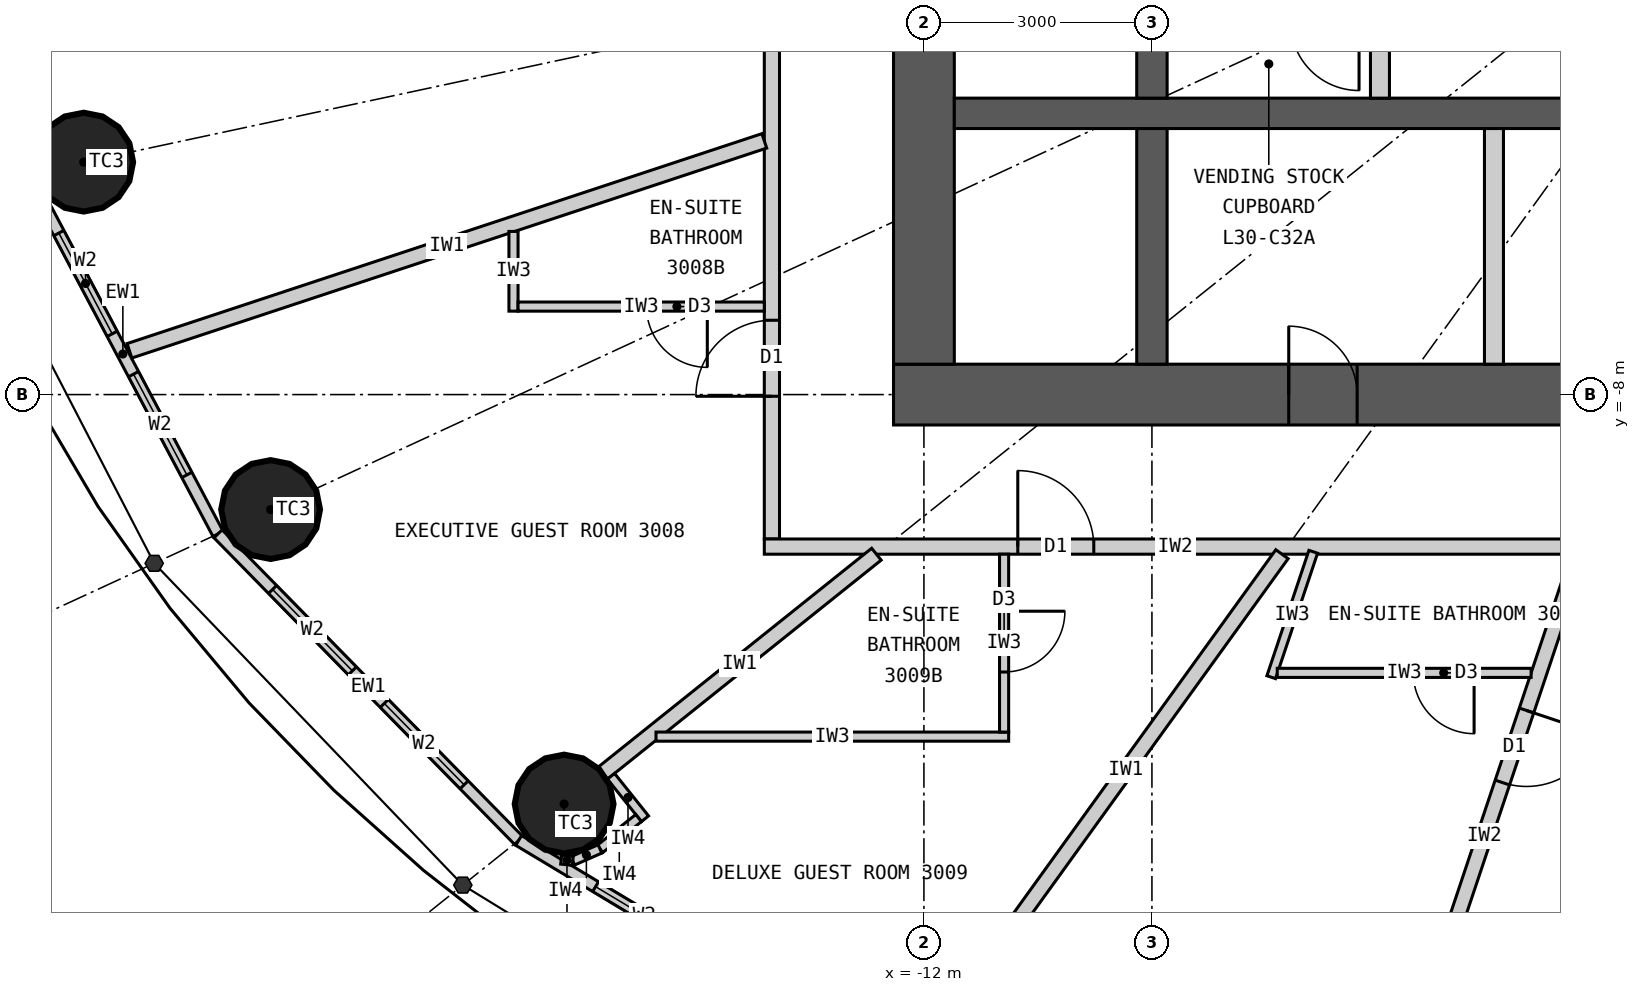
"""IFC4 building model, lengths in metres.
Left out: names, types, materials, properties, quantities, classifications, styles, units other than length and angle.
Written with IfcOpenShell. Run it as: python <this file> out.ifc"""

import sys

from ifc_helpers import new_model, si_unit, direction, frame, frame_2d, origin, origin_2d, place, context, subcontext, project, spatial, rectangle, circle, extrude, element, fill, save


model = new_model("IFC4")
c1 = context("Model", 3, precision=1e-05, world=origin(), true_north=direction((0.0, 1.0)))
c2 = subcontext(c1, "Body", "Model", "MODEL_VIEW")
j1 = project(units=[si_unit("LENGTHUNIT", "METRE"), si_unit("PLANEANGLEUNIT", "RADIAN")], contexts=[c1])
p1 = place(None, origin())
s1 = spatial("IfcSite", under=j1, at=p1, CompositionType="ELEMENT")
p2 = place(p1, origin())
s2 = spatial("IfcBuilding", under=s1, at=p2, CompositionType="ELEMENT")
p3 = place(p2, frame((0.0, 0.0, 118.8)))
s3 = spatial("IfcBuildingStorey", under=s2, at=p3, CompositionType="ELEMENT", Elevation=118.8)
for number, where, z_axis, x_axis in (
    (1, (-23.055, -4.942, 0.0), (0.0, 0.0, 1.0), (1.0, 0.0, 0.0)),
    (2, (-20.596, -9.513, 0.0), (0.0, 0.0, 1.0), (1.0, 0.0, 0.0)),
    (3, (-16.734, -13.387, 0.0), (0.0, 0.0, 1.0), (1.0, 0.0, 0.0)),
):
    element("IfcColumn", number, at=place(p3, frame(where, z_axis=z_axis, x_axis=x_axis)), inside=s3, PredefinedType="COLUMN", context=c2, shape_type="SweptSolid", body=[
        extrude(circle(Radius=0.65, at=origin_2d()), origin(), (0.0, 0.0, 1.0), 3.3),
    ])
p4 = place(p3, frame((12.4, -8.0, 0.0), z_axis=(0.0, 0.0, 1.0), x_axis=(-1.0, 0.0, 0.0)))
e4 = element("IfcWall", 4, at=p4, inside=s3, PredefinedType="SHEAR", context=c2, shape_type="SweptSolid", body=[
    extrude(rectangle(XDim=24.8, YDim=0.8, at=frame_2d((12.4, 0.0))), origin(), (0.0, 0.0, 1.0), 3.3),
])
p5 = place(p4, frame((11.1, 0.0, 0.0)))
e5 = element("IfcOpeningElement", 5, at=p5, cuts=e4, PredefinedType="OPENING", context=c2, shape_type="SweptSolid", body=[
    extrude(rectangle(XDim=1.2, YDim=2.2, at=frame_2d((0.6, 1.1))), frame((0.0, 0.41, 0.0), z_axis=(0.0, -1.0, 0.0), x_axis=(1.0, 0.0, 0.0)), (0.0, 0.0, 1.0), 0.82),
])
p6 = place(p4, frame((18.7, 0.0, 0.0)))
e6 = element("IfcOpeningElement", 6, at=p6, cuts=e4, PredefinedType="OPENING", context=c2, shape_type="SweptSolid", body=[
    extrude(rectangle(XDim=0.9, YDim=2.2, at=frame_2d((0.45, 1.1))), frame((0.0, 0.41, 0.0), z_axis=(0.0, -1.0, 0.0), x_axis=(1.0, 0.0, 0.0)), (0.0, 0.0, 1.0), 0.82),
])
p7 = place(p3, frame((-12.0, 7.6, 0.0), z_axis=(0.0, 0.0, 1.0), x_axis=(0.0, -1.0, 0.0)))
e7 = element("IfcWall", 7, at=p7, inside=s3, PredefinedType="SHEAR", context=c2, shape_type="SweptSolid", body=[
    extrude(rectangle(XDim=15.2, YDim=0.8, at=frame_2d((7.6, 0.0))), origin(), (0.0, 0.0, 1.0), 3.3),
])
p8 = place(p7, frame((6.7, 0.0, 0.0)))
e8 = element("IfcOpeningElement", 8, at=p8, cuts=e7, PredefinedType="OPENING", context=c2, shape_type="SweptSolid", body=[
    extrude(rectangle(XDim=1.8, YDim=2.2, at=frame_2d((0.9, 1.1))), frame((0.0, 0.41, 0.0), z_axis=(0.0, -1.0, 0.0), x_axis=(1.0, 0.0, 0.0)), (0.0, 0.0, 1.0), 0.82),
])
p9 = place(p3, frame((-11.6, -4.3, 0.0), z_axis=(0.0, 0.0, 1.0), x_axis=(1.0, 0.0, 0.0)))
e9 = element("IfcWall", 9, at=p9, inside=s3, PredefinedType="SHEAR", context=c2, shape_type="SweptSolid", body=[
    extrude(rectangle(XDim=23.2, YDim=0.4, at=frame_2d((11.6, 0.0))), origin(), (0.0, 0.0, 1.0), 3.3),
])
p10 = place(p3, frame((-9.0, -4.1, 0.0), z_axis=(0.0, 0.0, 1.0), x_axis=(0.0, 1.0, 0.0)))
e10 = element("IfcWall", 10, at=p10, inside=s3, PredefinedType="SHEAR", context=c2, shape_type="SweptSolid", body=[
    extrude(rectangle(XDim=2.35, YDim=0.4, at=frame_2d((1.175, 0.0))), origin(), (0.0, 0.0, 1.0), 3.3),
])
p11 = place(p3, frame((-9.0, -7.6, 0.0), z_axis=(0.0, 0.0, 1.0), x_axis=(0.0, 1.0, 0.0)))
e11 = element("IfcWall", 11, at=p11, inside=s3, PredefinedType="SHEAR", context=c2, shape_type="SweptSolid", body=[
    extrude(rectangle(XDim=3.1, YDim=0.4, at=frame_2d((1.55, 0.0))), origin(), (0.0, 0.0, 1.0), 3.3),
])
p12 = place(p3, frame((-4.5, -7.6, 0.0), z_axis=(0.0, 0.0, 1.0), x_axis=(0.0, 1.0, 0.0)))
e12 = element("IfcWall", 12, at=p12, inside=s3, PredefinedType="PARTITIONING", context=c2, shape_type="SweptSolid", body=[
    extrude(rectangle(XDim=3.1, YDim=0.25, at=frame_2d((1.55, 0.0))), origin(), (0.0, 0.0, 1.0), 3.3),
])
p13 = place(p3, frame((-6.0, -4.1, 0.0), z_axis=(0.0, 0.0, 1.0), x_axis=(0.0, 1.0, 0.0)))
e13 = element("IfcWall", 13, at=p13, inside=s3, PredefinedType="PARTITIONING", context=c2, shape_type="SweptSolid", body=[
    extrude(rectangle(XDim=2.35, YDim=0.25, at=frame_2d((1.175, 0.0))), origin(), (0.0, 0.0, 1.0), 3.3),
])
p14 = place(p3, frame((-23.792, -5.1, 0.0), z_axis=(0.0, 0.0, 1.0), x_axis=(0.467814388454, -0.883826735257, 0.0)))
e14 = element("IfcWall", 14, at=p14, inside=s3, PredefinedType="ELEMENTEDWALL", context=c2, shape_type="SweptSolid", body=[
    extrude(rectangle(XDim=5.354, YDim=0.15, at=frame_2d((2.677, 0.0))), origin(), (0.0, 0.0, 1.0), 3.12),
])
p15 = place(p14, frame((0.877, 0.0, 0.9)))
e15 = element("IfcOpeningElement", 15, at=p15, cuts=e14, PredefinedType="OPENING", context=c2, shape_type="SweptSolid", body=[
    extrude(rectangle(XDim=1.5, YDim=1.9, at=frame_2d((0.75, 0.95))), frame((0.0, 0.085, 0.0), z_axis=(0.0, -1.0, 0.0), x_axis=(1.0, 0.0, 0.0)), (0.0, 0.0, 1.0), 0.17),
])
p16 = place(p14, frame((2.977, 0.0, 0.9)))
e16 = element("IfcOpeningElement", 16, at=p16, cuts=e14, PredefinedType="OPENING", context=c2, shape_type="SweptSolid", body=[
    extrude(rectangle(XDim=1.5, YDim=1.9, at=frame_2d((0.75, 0.95))), frame((0.0, 0.085, 0.0), z_axis=(0.0, -1.0, 0.0), x_axis=(1.0, 0.0, 0.0)), (0.0, 0.0, 1.0), 0.17),
])
p17 = place(p3, frame((-21.287, -9.832, 0.0), z_axis=(0.0, 0.0, 1.0), x_axis=(0.700136650834, -0.714008872605, 0.0)))
e17 = element("IfcWall", 17, at=p17, inside=s3, PredefinedType="ELEMENTEDWALL", context=c2, shape_type="SweptSolid", body=[
    extrude(rectangle(XDim=5.649, YDim=0.15, at=frame_2d((2.825, 0.0))), origin(), (0.0, 0.0, 1.0), 3.12),
])
p18 = place(p17, frame((1.025, 0.0, 0.9)))
e18 = element("IfcOpeningElement", 18, at=p18, cuts=e17, PredefinedType="OPENING", context=c2, shape_type="SweptSolid", body=[
    extrude(rectangle(XDim=1.5, YDim=1.9, at=frame_2d((0.75, 0.95))), frame((0.0, 0.085, 0.0), z_axis=(0.0, -1.0, 0.0), x_axis=(1.0, 0.0, 0.0)), (0.0, 0.0, 1.0), 0.17),
])
p19 = place(p17, frame((3.125, 0.0, 0.9)))
e19 = element("IfcOpeningElement", 19, at=p19, cuts=e17, PredefinedType="OPENING", context=c2, shape_type="SweptSolid", body=[
    extrude(rectangle(XDim=1.5, YDim=1.9, at=frame_2d((0.75, 0.95))), frame((0.0, 0.085, 0.0), z_axis=(0.0, -1.0, 0.0), x_axis=(1.0, 0.0, 0.0)), (0.0, 0.0, 1.0), 0.17),
])
p20 = place(p3, frame((-17.332, -13.866, 0.0), z_axis=(0.0, 0.0, 1.0), x_axis=(0.857308573723, -0.514802884044, 0.0)))
e20 = element("IfcWall", 20, at=p20, inside=s3, PredefinedType="ELEMENTEDWALL", context=c2, shape_type="SweptSolid", body=[
    extrude(rectangle(XDim=5.961, YDim=0.15, at=frame_2d((2.98, 0.0))), origin(), (0.0, 0.0, 1.0), 3.12),
])
p21 = place(p20, frame((1.181, 0.0, 0.9)))
e21 = element("IfcOpeningElement", 21, at=p21, cuts=e20, PredefinedType="OPENING", context=c2, shape_type="SweptSolid", body=[
    extrude(rectangle(XDim=1.5, YDim=1.9, at=frame_2d((0.75, 0.95))), frame((0.0, 0.085, 0.0), z_axis=(0.0, -1.0, 0.0), x_axis=(1.0, 0.0, 0.0)), (0.0, 0.0, 1.0), 0.17),
])
p22 = place(p20, frame((3.281, 0.0, 0.9)))
e22 = element("IfcOpeningElement", 22, at=p22, cuts=e20, PredefinedType="OPENING", context=c2, shape_type="SweptSolid", body=[
    extrude(rectangle(XDim=1.5, YDim=1.9, at=frame_2d((0.75, 0.95))), frame((0.0, 0.085, 0.0), z_axis=(0.0, -1.0, 0.0), x_axis=(1.0, 0.0, 0.0)), (0.0, 0.0, 1.0), 0.17),
])
p23 = place(p3, frame((-14.0, 9.9, 0.0), z_axis=(0.0, 0.0, 1.0), x_axis=(0.0, -1.0, 0.0)))
e23 = element("IfcWall", 23, at=p23, inside=s3, PredefinedType="PARTITIONING", context=c2, shape_type="SweptSolid", body=[
    extrude(rectangle(XDim=19.8, YDim=0.2, at=frame_2d((9.9, 0.0))), origin(), (0.0, 0.0, 1.0), 3.12),
])
p24 = place(p23, frame((1.678, 0.0, 0.0)))
e24 = element("IfcOpeningElement", 24, at=p24, cuts=e23, PredefinedType="OPENING", context=c2, shape_type="SweptSolid", body=[
    extrude(rectangle(XDim=1.0, YDim=2.2, at=frame_2d((0.5, 1.1))), frame((0.0, 0.11, 0.0), z_axis=(0.0, -1.0, 0.0), x_axis=(1.0, 0.0, 0.0)), (0.0, 0.0, 1.0), 0.22),
])
p25 = place(p23, frame((7.598, 0.0, 0.0)))
e25 = element("IfcOpeningElement", 25, at=p25, cuts=e23, PredefinedType="OPENING", context=c2, shape_type="SweptSolid", body=[
    extrude(rectangle(XDim=1.0, YDim=2.2, at=frame_2d((0.5, 1.1))), frame((0.0, 0.11, 0.0), z_axis=(0.0, -1.0, 0.0), x_axis=(1.0, 0.0, 0.0)), (0.0, 0.0, 1.0), 0.22),
])
p26 = place(p23, frame((12.26, 0.0, 0.0)))
e26 = element("IfcOpeningElement", 26, at=p26, cuts=e23, PredefinedType="OPENING", context=c2, shape_type="SweptSolid", body=[
    extrude(rectangle(XDim=1.0, YDim=2.2, at=frame_2d((0.5, 1.1))), frame((0.0, 0.11, 0.0), z_axis=(0.0, -1.0, 0.0), x_axis=(1.0, 0.0, 0.0)), (0.0, 0.0, 1.0), 0.22),
])
p27 = place(p23, frame((16.922, 0.0, 0.0)))
e27 = element("IfcOpeningElement", 27, at=p27, cuts=e23, PredefinedType="OPENING", context=c2, shape_type="SweptSolid", body=[
    extrude(rectangle(XDim=1.0, YDim=2.2, at=frame_2d((0.5, 1.1))), frame((0.0, 0.11, 0.0), z_axis=(0.0, -1.0, 0.0), x_axis=(1.0, 0.0, 0.0)), (0.0, 0.0, 1.0), 0.22),
])
p28 = place(p3, frame((-3.283, -10.0, 0.0), z_axis=(0.0, 0.0, 1.0), x_axis=(-1.0, 0.0, 0.0)))
e28 = element("IfcWall", 28, at=p28, inside=s3, PredefinedType="PARTITIONING", context=c2, shape_type="SweptSolid", body=[
    extrude(rectangle(XDim=10.817, YDim=0.2, at=frame_2d((5.409, 0.0))), origin(), (0.0, 0.0, 1.0), 3.12),
])
p29 = place(p28, frame((6.482, 0.0, 0.0)))
e29 = element("IfcOpeningElement", 29, at=p29, cuts=e28, PredefinedType="OPENING", context=c2, shape_type="SweptSolid", body=[
    extrude(rectangle(XDim=1.0, YDim=2.2, at=frame_2d((0.5, 1.1))), frame((0.0, 0.11, 0.0), z_axis=(0.0, -1.0, 0.0), x_axis=(1.0, 0.0, 0.0)), (0.0, 0.0, 1.0), 0.22),
])
p30 = place(p3, frame((-14.1, -4.662, 0.0), z_axis=(0.0, 0.0, 1.0), x_axis=(-0.949446466373, -0.313928984789, 0.0)))
e30 = element("IfcWall", 30, at=p30, inside=s3, PredefinedType="PARTITIONING", context=c2, shape_type="SweptSolid", body=[
    extrude(rectangle(XDim=8.797, YDim=0.2, at=frame_2d((4.399, 0.0))), origin(), (0.0, 0.0, 1.0), 3.12),
])
p31 = place(p3, frame((-12.625, -10.1, 0.0), z_axis=(0.0, 0.0, 1.0), x_axis=(-0.780863644897, -0.624701503182, 0.0)))
e31 = element("IfcWall", 31, at=p31, inside=s3, PredefinedType="PARTITIONING", context=c2, shape_type="SweptSolid", body=[
    extrude(rectangle(XDim=4.612, YDim=0.2, at=frame_2d((2.306, 0.0))), origin(), (0.0, 0.0, 1.0), 2.37),
])
p32 = place(p3, frame((-7.289, -10.1, 0.0), z_axis=(0.0, 0.0, 1.0), x_axis=(-0.585217367024, -0.81087645997, 0.0)))
e32 = element("IfcWall", 32, at=p32, inside=s3, PredefinedType="PARTITIONING", context=c2, shape_type="SweptSolid", body=[
    extrude(rectangle(XDim=7.016, YDim=0.2, at=frame_2d((3.508, 0.0))), origin(), (0.0, 0.0, 1.0), 2.37),
])
p33 = place(p3, frame((-3.383, -10.1, 0.0), z_axis=(0.0, 0.0, 1.0), x_axis=(-0.317603705574, -0.948223542318, 0.0)))
e33 = element("IfcWall", 33, at=p33, inside=s3, PredefinedType="PARTITIONING", context=c2, shape_type="SweptSolid", body=[
    extrude(rectangle(XDim=7.823, YDim=0.2, at=frame_2d((3.912, 0.0))), origin(), (0.0, 0.0, 1.0), 2.37),
])
p34 = place(p33, frame((2.168, 0.0, 0.0)))
e34 = element("IfcOpeningElement", 34, at=p34, cuts=e33, PredefinedType="OPENING", context=c2, shape_type="SweptSolid", body=[
    extrude(rectangle(XDim=1.0, YDim=2.2, at=frame_2d((0.5, 1.1))), frame((0.0, 0.11, 0.0), z_axis=(0.0, -1.0, 0.0), x_axis=(1.0, 0.0, 0.0)), (0.0, 0.0, 1.0), 0.22),
])
p35 = place(p3, frame((-17.4, -5.854, 0.0), z_axis=(0.0, 0.0, 1.0), x_axis=(0.0, -1.0, 0.0)))
e35 = element("IfcWall", 35, at=p35, inside=s3, PredefinedType="PARTITIONING", context=c2, shape_type="SweptSolid", body=[
    extrude(rectangle(XDim=1.049, YDim=0.12, at=frame_2d((0.524, 0.0))), origin(), (0.0, 0.0, 1.0), 3.12),
])
p36 = place(p3, frame((-14.1, -6.842, 0.0), z_axis=(0.0, 0.0, 1.0), x_axis=(-1.0, 0.0, 0.0)))
e36 = element("IfcWall", 36, at=p36, inside=s3, PredefinedType="PARTITIONING", context=c2, shape_type="SweptSolid", body=[
    extrude(rectangle(XDim=3.24, YDim=0.12, at=frame_2d((1.62, 0.0))), origin(), (0.0, 0.0, 1.0), 3.12),
])
p37 = place(p36, frame((0.75, 0.0, 0.0)))
e37 = element("IfcOpeningElement", 37, at=p37, cuts=e36, PredefinedType="OPENING", context=c2, shape_type="SweptSolid", body=[
    extrude(rectangle(XDim=0.8, YDim=2.1, at=frame_2d((0.4, 1.05))), frame((0.0, 0.07, 0.0), z_axis=(0.0, -1.0, 0.0), x_axis=(1.0, 0.0, 0.0)), (0.0, 0.0, 1.0), 0.14),
])
p38 = place(p3, frame((-15.525, -12.5, 0.0), z_axis=(0.0, 0.0, 1.0), x_axis=(1.0, 0.0, 0.0)))
e38 = element("IfcWall", 38, at=p38, inside=s3, PredefinedType="PARTITIONING", context=c2, shape_type="SweptSolid", body=[
    extrude(rectangle(XDim=4.64, YDim=0.12, at=frame_2d((2.32, 0.0))), origin(), (0.0, 0.0, 1.0), 3.12),
])
p39 = place(p3, frame((-10.945, -10.1, 0.0), z_axis=(0.0, 0.0, 1.0), x_axis=(0.0, -1.0, 0.0)))
e39 = element("IfcWall", 39, at=p39, inside=s3, PredefinedType="PARTITIONING", context=c2, shape_type="SweptSolid", body=[
    extrude(rectangle(XDim=2.34, YDim=0.12, at=frame_2d((1.17, 0.0))), origin(), (0.0, 0.0, 1.0), 3.12),
])
p40 = place(p39, frame((0.75, 0.0, 0.0)))
e40 = element("IfcOpeningElement", 40, at=p40, cuts=e39, PredefinedType="OPENING", context=c2, shape_type="SweptSolid", body=[
    extrude(rectangle(XDim=0.8, YDim=2.1, at=frame_2d((0.4, 1.05))), frame((0.0, 0.07, 0.0), z_axis=(0.0, -1.0, 0.0), x_axis=(1.0, 0.0, 0.0)), (0.0, 0.0, 1.0), 0.14),
])
p41 = place(p3, frame((-6.878, -10.068, 0.0), z_axis=(0.0, 0.0, 1.0), x_axis=(-0.317532394508, -0.948247424694, 0.0)))
e41 = element("IfcWall", 41, at=p41, inside=s3, PredefinedType="PARTITIONING", context=c2, shape_type="SweptSolid", body=[
    extrude(rectangle(XDim=1.74, YDim=0.12, at=frame_2d((0.87, 0.0))), origin(), (0.0, 0.0, 1.0), 3.12),
])
p42 = place(p3, frame((-4.011, -11.661, 0.0), z_axis=(0.0, 0.0, 1.0), x_axis=(-1.0, 0.0, 0.0)))
e42 = element("IfcWall", 42, at=p42, inside=s3, PredefinedType="PARTITIONING", context=c2, shape_type="SweptSolid", body=[
    extrude(rectangle(XDim=3.34, YDim=0.12, at=frame_2d((1.67, 0.0))), origin(), (0.0, 0.0, 1.0), 3.12),
])
p43 = place(p42, frame((0.75, 0.0, 0.0)))
e43 = element("IfcOpeningElement", 43, at=p43, cuts=e42, PredefinedType="OPENING", context=c2, shape_type="SweptSolid", body=[
    extrude(rectangle(XDim=0.8, YDim=2.1, at=frame_2d((0.4, 1.05))), frame((0.0, 0.07, 0.0), z_axis=(0.0, -1.0, 0.0), x_axis=(1.0, 0.0, 0.0)), (0.0, 0.0, 1.0), 0.14),
])
p44 = place(p3, frame((-16.117, -13.022, 0.0), z_axis=(0.0, 0.0, 1.0), x_axis=(0.62465344249, -0.780902091677, 0.0)))
e44 = element("IfcWall", 44, at=p44, inside=s3, PredefinedType="PARTITIONING", context=c2, shape_type="SweptSolid", body=[
    extrude(rectangle(XDim=0.716, YDim=0.12, at=frame_2d((0.358, 0.0))), origin(), (0.0, 0.0, 1.0), 3.12),
])
p45 = place(p3, frame((-15.754, -13.571, 0.0), z_axis=(0.0, 0.0, 1.0), x_axis=(-0.780905453553, -0.624649239663, 0.0)))
e45 = element("IfcWall", 45, at=p45, inside=s3, PredefinedType="PARTITIONING", context=c2, shape_type="SweptSolid", body=[
    extrude(rectangle(XDim=0.65, YDim=0.12, at=frame_2d((0.325, 0.0))), origin(), (0.0, 0.0, 1.0), 3.12),
])
p46 = place(p3, frame((-16.262, -13.977, 0.0), z_axis=(0.0, 0.0, 1.0), x_axis=(-0.915985403703, -0.401211590314, 0.0)))
e46 = element("IfcWall", 46, at=p46, inside=s3, PredefinedType="PARTITIONING", context=c2, shape_type="SweptSolid", body=[
    extrude(rectangle(XDim=0.391, YDim=0.12, at=frame_2d((0.196, 0.0))), origin(), (0.0, 0.0, 1.0), 3.12),
])
p47 = place(p3, frame((-16.62, -14.134, 0.0), z_axis=(0.0, 0.0, 1.0), x_axis=(-0.993941871493, 0.109907033867, 0.0)))
e47 = element("IfcWall", 47, at=p47, inside=s3, PredefinedType="PARTITIONING", context=c2, shape_type="SweptSolid", body=[
    extrude(rectangle(XDim=0.153, YDim=0.12, at=frame_2d((0.077, 0.0))), origin(), (0.0, 0.0, 1.0), 3.12),
])
p48 = place(p15, origin())
e48 = element("IfcWindow", 48, at=p48, inside=s3, PartitioningType="SINGLE_PANEL", PredefinedType="WINDOW", context=c2, shape_type="SweptSolid", body=[
    extrude(rectangle(XDim=1.5, YDim=1.9, at=frame_2d((0.75, 0.95))), frame((0.0, 0.03, 0.0), z_axis=(0.0, -1.0, 0.0), x_axis=(1.0, 0.0, 0.0)), (0.0, 0.0, 1.0), 0.06),
])
fill(e15, e48)
p49 = place(p16, origin())
e49 = element("IfcWindow", 49, at=p49, inside=s3, PartitioningType="SINGLE_PANEL", PredefinedType="WINDOW", context=c2, shape_type="SweptSolid", body=[
    extrude(rectangle(XDim=1.5, YDim=1.9, at=frame_2d((0.75, 0.95))), frame((0.0, 0.03, 0.0), z_axis=(0.0, -1.0, 0.0), x_axis=(1.0, 0.0, 0.0)), (0.0, 0.0, 1.0), 0.06),
])
fill(e16, e49)
p50 = place(p18, origin())
e50 = element("IfcWindow", 50, at=p50, inside=s3, PartitioningType="SINGLE_PANEL", PredefinedType="WINDOW", context=c2, shape_type="SweptSolid", body=[
    extrude(rectangle(XDim=1.5, YDim=1.9, at=frame_2d((0.75, 0.95))), frame((0.0, 0.03, 0.0), z_axis=(0.0, -1.0, 0.0), x_axis=(1.0, 0.0, 0.0)), (0.0, 0.0, 1.0), 0.06),
])
fill(e18, e50)
p51 = place(p19, origin())
e51 = element("IfcWindow", 51, at=p51, inside=s3, PartitioningType="SINGLE_PANEL", PredefinedType="WINDOW", context=c2, shape_type="SweptSolid", body=[
    extrude(rectangle(XDim=1.5, YDim=1.9, at=frame_2d((0.75, 0.95))), frame((0.0, 0.03, 0.0), z_axis=(0.0, -1.0, 0.0), x_axis=(1.0, 0.0, 0.0)), (0.0, 0.0, 1.0), 0.06),
])
fill(e19, e51)
p52 = place(p21, origin())
e52 = element("IfcWindow", 52, at=p52, inside=s3, PartitioningType="SINGLE_PANEL", PredefinedType="WINDOW", context=c2, shape_type="SweptSolid", body=[
    extrude(rectangle(XDim=1.5, YDim=1.9, at=frame_2d((0.75, 0.95))), frame((0.0, 0.03, 0.0), z_axis=(0.0, -1.0, 0.0), x_axis=(1.0, 0.0, 0.0)), (0.0, 0.0, 1.0), 0.06),
])
fill(e21, e52)
p53 = place(p37, origin())
e53 = element("IfcDoor", 53, at=p53, inside=s3, OperationType="SINGLE_SWING_LEFT", PredefinedType="DOOR", context=c2, shape_type="SweptSolid", body=[
    extrude(rectangle(XDim=0.8, YDim=2.1, at=frame_2d((0.4, 1.05))), frame((0.0, 0.025, 0.0), z_axis=(0.0, -1.0, 0.0), x_axis=(1.0, 0.0, 0.0)), (0.0, 0.0, 1.0), 0.05),
])
fill(e37, e53)
p54 = place(p27, origin())
e54 = element("IfcDoor", 54, at=p54, inside=s3, OperationType="SINGLE_SWING_RIGHT", PredefinedType="DOOR", context=c2, shape_type="SweptSolid", body=[
    extrude(rectangle(XDim=1.0, YDim=2.2, at=frame_2d((0.5, 1.1))), frame((0.0, 0.025, 0.0), z_axis=(0.0, -1.0, 0.0), x_axis=(1.0, 0.0, 0.0)), (0.0, 0.0, 1.0), 0.05),
])
fill(e27, e54)
p55 = place(p40, origin())
e55 = element("IfcDoor", 55, at=p55, inside=s3, OperationType="SINGLE_SWING_LEFT", PredefinedType="DOOR", context=c2, shape_type="SweptSolid", body=[
    extrude(rectangle(XDim=0.8, YDim=2.1, at=frame_2d((0.4, 1.05))), frame((0.0, 0.025, 0.0), z_axis=(0.0, -1.0, 0.0), x_axis=(1.0, 0.0, 0.0)), (0.0, 0.0, 1.0), 0.05),
])
fill(e40, e55)
p56 = place(p29, origin())
e56 = element("IfcDoor", 56, at=p56, inside=s3, OperationType="SINGLE_SWING_RIGHT", PredefinedType="DOOR", context=c2, shape_type="SweptSolid", body=[
    extrude(rectangle(XDim=1.0, YDim=2.2, at=frame_2d((0.5, 1.1))), frame((0.0, 0.025, 0.0), z_axis=(0.0, -1.0, 0.0), x_axis=(1.0, 0.0, 0.0)), (0.0, 0.0, 1.0), 0.05),
])
fill(e29, e56)
p57 = place(p43, origin())
e57 = element("IfcDoor", 57, at=p57, inside=s3, OperationType="SINGLE_SWING_LEFT", PredefinedType="DOOR", context=c2, shape_type="SweptSolid", body=[
    extrude(rectangle(XDim=0.8, YDim=2.1, at=frame_2d((0.4, 1.05))), frame((0.0, 0.025, 0.0), z_axis=(0.0, -1.0, 0.0), x_axis=(1.0, 0.0, 0.0)), (0.0, 0.0, 1.0), 0.05),
])
fill(e43, e57)
p58 = place(p34, origin())
e58 = element("IfcDoor", 58, at=p58, inside=s3, OperationType="SINGLE_SWING_LEFT", PredefinedType="DOOR", context=c2, shape_type="SweptSolid", body=[
    extrude(rectangle(XDim=1.0, YDim=2.2, at=frame_2d((0.5, 1.1))), frame((0.0, 0.025, 0.0), z_axis=(0.0, -1.0, 0.0), x_axis=(1.0, 0.0, 0.0)), (0.0, 0.0, 1.0), 0.05),
])
fill(e34, e58)
p59 = place(p6, origin())
e59 = element("IfcDoor", 59, at=p59, inside=s3, OperationType="SINGLE_SWING_RIGHT", PredefinedType="DOOR", context=c2, shape_type="SweptSolid", body=[
    extrude(rectangle(XDim=0.9, YDim=2.2, at=frame_2d((0.45, 1.1))), frame((0.0, 0.025, 0.0), z_axis=(0.0, -1.0, 0.0), x_axis=(1.0, 0.0, 0.0)), (0.0, 0.0, 1.0), 0.05),
])
fill(e6, e59)
save(model, sys.argv[1])
